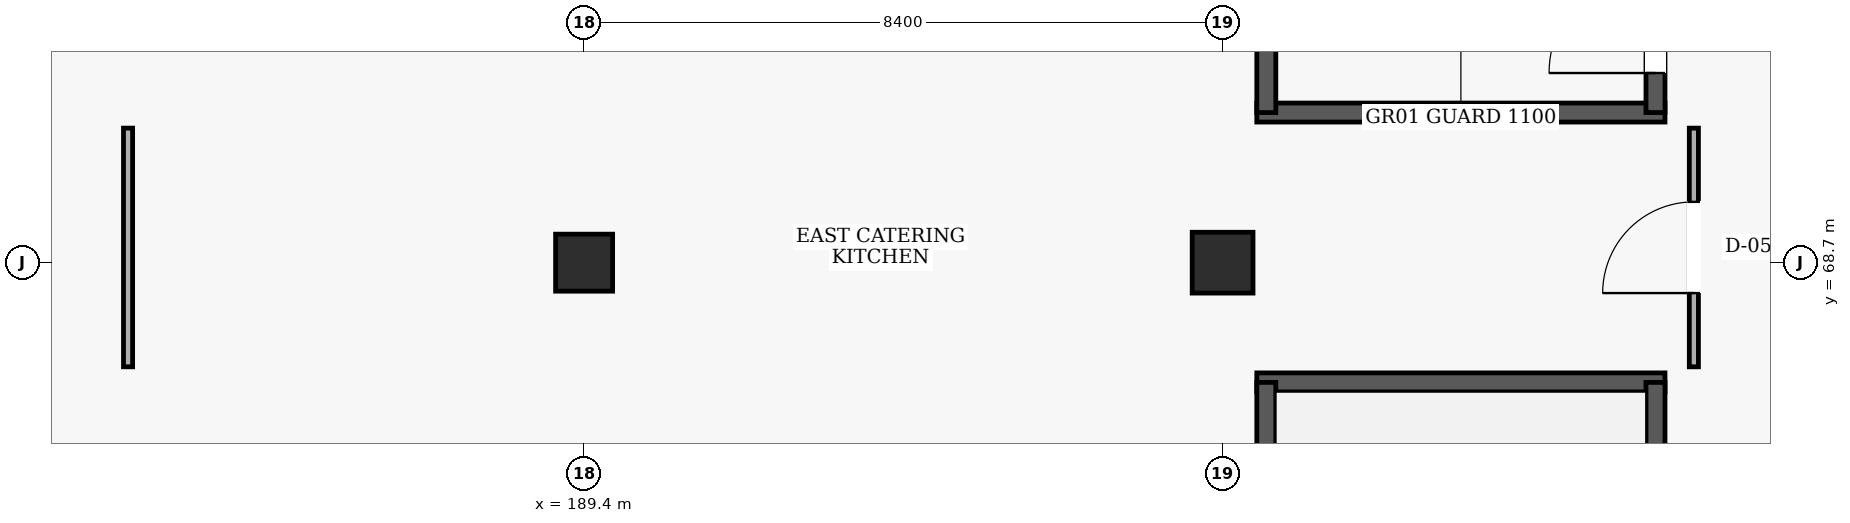
"""IFC4 building model, lengths in metres.
Left out: names, types, materials, properties, quantities, classifications, styles, units other than length and angle.
Written with IfcOpenShell. Run it as: python <this file> out.ifc"""

import sys

from ifc_helpers import new_model, si_unit, direction, frame, frame_2d, origin, origin_2d, place, context, subcontext, project, spatial, rectangle, extrude, element, fill, save


model = new_model("IFC4")
c1 = context("Model", 3, precision=1e-05, world=origin(), true_north=direction((0.0, 1.0)))
c2 = subcontext(c1, "Body", "Model", "MODEL_VIEW")
j1 = project(units=[si_unit("LENGTHUNIT", "METRE"), si_unit("PLANEANGLEUNIT", "RADIAN")], contexts=[c1])
p1 = place(None, origin())
s1 = spatial("IfcSite", under=j1, at=p1, CompositionType="ELEMENT")
p2 = place(p1, origin())
s2 = spatial("IfcBuilding", under=s1, at=p2, CompositionType="ELEMENT")
p3 = place(p2, frame((0.0, 0.0, 10.2)))
s3 = spatial("IfcBuildingStorey", under=s2, at=p3, CompositionType="ELEMENT", Elevation=10.2)
p4 = place(p3, frame((189.4, 68.7, 0.0), z_axis=(0.0, 0.0, 1.0), x_axis=(1.0, 0.0, 0.0)))
e1 = element("IfcColumn", 1, at=p4, inside=s3, PredefinedType="COLUMN", context=c2, shape_type="SweptSolid", body=[
    extrude(rectangle(XDim=0.75, YDim=0.75, at=origin_2d()), origin(), (0.0, 0.0, 1.0), 4.8),
])
p5 = place(p3, frame((197.8, 68.7, 0.0), z_axis=(0.0, 0.0, 1.0), x_axis=(1.0, 0.0, 0.0)))
e2 = element("IfcColumn", 2, at=p5, inside=s3, PredefinedType="COLUMN", context=c2, shape_type="SweptSolid", body=[
    extrude(rectangle(XDim=0.8, YDim=0.8, at=origin_2d()), origin(), (0.0, 0.0, 1.0), 4.8),
])
p6 = place(p3, frame((203.62, 67.125, 0.0), z_axis=(0.0, 0.0, 1.0), x_axis=(-1.0, 0.0, 0.0)))
e3 = element("IfcWall", 3, at=p6, inside=s3, PredefinedType="SHEAR", context=c2, shape_type="SweptSolid", body=[
    extrude(rectangle(XDim=5.37, YDim=0.25, at=frame_2d((2.685, 0.0))), origin(), (0.0, 0.0, 1.0), 4.48),
])
p7 = place(p3, frame((198.375, 56.275, 0.0), z_axis=(0.0, 0.0, 1.0), x_axis=(0.0, 1.0, 0.0)))
e4 = element("IfcWall", 4, at=p7, inside=s3, PredefinedType="SHEAR", context=c2, shape_type="SweptSolid", body=[
    extrude(rectangle(XDim=10.85, YDim=0.25, at=frame_2d((5.425, 0.0))), origin(), (0.0, 0.0, 1.0), 4.48),
])
p8 = place(p3, frame((203.495, 56.275, 0.0), z_axis=(0.0, 0.0, 1.0), x_axis=(0.0, 1.0, 0.0)))
e5 = element("IfcWall", 5, at=p8, inside=s3, PredefinedType="SHEAR", context=c2, shape_type="SweptSolid", body=[
    extrude(rectangle(XDim=10.85, YDim=0.25, at=frame_2d((5.425, 0.0))), origin(), (0.0, 0.0, 1.0), 4.48),
])
p9 = place(p8, frame((0.52, 0.0, 0.0)))
e6 = element("IfcOpeningElement", 6, at=p9, cuts=e5, PredefinedType="OPENING", context=c2, shape_type="SweptSolid", body=[
    extrude(rectangle(XDim=1.4, YDim=2.15, at=frame_2d((0.7, 1.075))), frame((0.0, 0.135, 0.0), z_axis=(0.0, -1.0, 0.0), x_axis=(1.0, 0.0, 0.0)), (0.0, 0.0, 1.0), 0.27),
])
p10 = place(p3, frame((198.25, 70.675, 0.0), z_axis=(0.0, 0.0, 1.0), x_axis=(1.0, 0.0, 0.0)))
e7 = element("IfcWall", 7, at=p10, inside=s3, PredefinedType="SHEAR", context=c2, shape_type="SweptSolid", body=[
    extrude(rectangle(XDim=5.37, YDim=0.25, at=frame_2d((2.685, 0.0))), origin(), (0.0, 0.0, 1.0), 4.48),
])
p11 = place(p3, frame((198.375, 70.675, 0.0), z_axis=(0.0, 0.0, 1.0), x_axis=(0.0, 1.0, 0.0)))
e8 = element("IfcWall", 8, at=p11, inside=s3, PredefinedType="SHEAR", context=c2, shape_type="SweptSolid", body=[
    extrude(rectangle(XDim=10.85, YDim=0.25, at=frame_2d((5.425, 0.0))), origin(), (0.0, 0.0, 1.0), 4.48),
])
p12 = place(p3, frame((203.495, 70.675, 0.0), z_axis=(0.0, 0.0, 1.0), x_axis=(0.0, 1.0, 0.0)))
e9 = element("IfcWall", 9, at=p12, inside=s3, PredefinedType="SHEAR", context=c2, shape_type="SweptSolid", body=[
    extrude(rectangle(XDim=10.85, YDim=0.25, at=frame_2d((5.425, 0.0))), origin(), (0.0, 0.0, 1.0), 4.48),
])
p13 = place(p12, frame((0.52, 0.0, 0.0)))
e10 = element("IfcOpeningElement", 10, at=p13, cuts=e9, PredefinedType="OPENING", context=c2, shape_type="SweptSolid", body=[
    extrude(rectangle(XDim=1.4, YDim=2.15, at=frame_2d((0.7, 1.075))), frame((0.0, 0.135, 0.0), z_axis=(0.0, -1.0, 0.0), x_axis=(1.0, 0.0, 0.0)), (0.0, 0.0, 1.0), 0.27),
])
p14 = place(p3, frame((204.0, 67.33, 0.0), z_axis=(0.0, 0.0, 1.0), x_axis=(0.0, 1.0, 0.0)))
e11 = element("IfcWall", 11, at=p14, inside=s3, PredefinedType="PARTITIONING", context=c2, shape_type="SweptSolid", body=[
    extrude(rectangle(XDim=3.14, YDim=0.12, at=frame_2d((1.57, 0.0))), origin(), (0.0, 0.0, 1.0), 4.48),
])
p15 = place(p14, frame((0.97, 0.0, 0.0)))
e12 = element("IfcOpeningElement", 12, at=p15, cuts=e11, PredefinedType="OPENING", context=c2, shape_type="SweptSolid", body=[
    extrude(rectangle(XDim=1.2, YDim=2.15, at=frame_2d((0.6, 1.075))), frame((0.0, 0.07, 0.0), z_axis=(0.0, -1.0, 0.0), x_axis=(1.0, 0.0, 0.0)), (0.0, 0.0, 1.0), 0.14),
])
p16 = place(p3, frame((183.4, 70.47, 0.0), z_axis=(0.0, 0.0, 1.0), x_axis=(0.0, -1.0, 0.0)))
e13 = element("IfcWall", 13, at=p16, inside=s3, PredefinedType="PARTITIONING", context=c2, shape_type="SweptSolid", body=[
    extrude(rectangle(XDim=3.14, YDim=0.12, at=frame_2d((1.57, 0.0))), origin(), (0.0, 0.0, 1.0), 4.48),
])
p17 = place(p13, origin())
e14 = element("IfcDoor", 14, at=p17, inside=s3, OperationType="SINGLE_SWING_LEFT", PredefinedType="DOOR", context=c2, shape_type="SweptSolid", body=[
    extrude(rectangle(XDim=1.4, YDim=2.15, at=frame_2d((0.7, 1.075))), frame((0.0, 0.025, 0.0), z_axis=(0.0, -1.0, 0.0), x_axis=(1.0, 0.0, 0.0)), (0.0, 0.0, 1.0), 0.05),
])
fill(e10, e14)
p18 = place(p15, origin())
e15 = element("IfcDoor", 15, at=p18, inside=s3, OperationType="SINGLE_SWING_LEFT", PredefinedType="DOOR", context=c2, shape_type="SweptSolid", body=[
    extrude(rectangle(XDim=1.2, YDim=2.15, at=frame_2d((0.6, 1.075))), frame((0.0, 0.025, 0.0), z_axis=(0.0, -1.0, 0.0), x_axis=(1.0, 0.0, 0.0)), (0.0, 0.0, 1.0), 0.05),
])
fill(e12, e15)
save(model, sys.argv[1])
